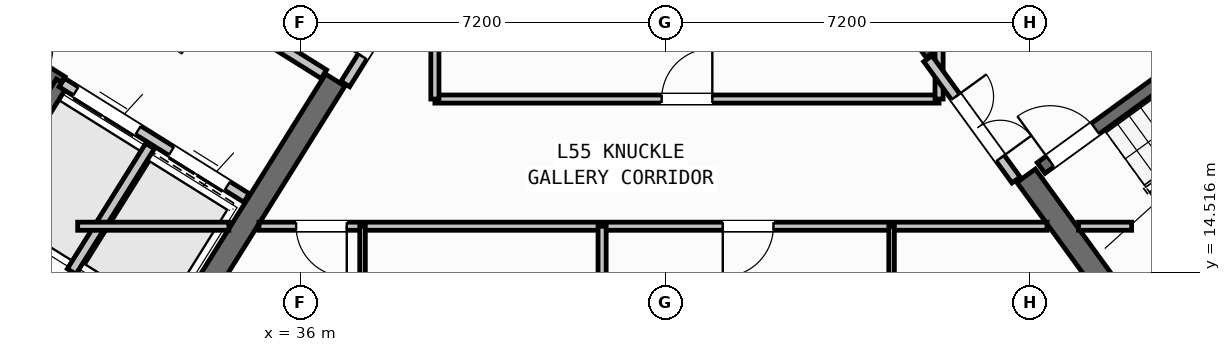
"""IFC4 building model, lengths in metres.
Left out: names, types, materials, properties, quantities, classifications, styles, units other than length and angle.
Written with IfcOpenShell. Run it as: python <this file> out.ifc"""

import sys

from ifc_helpers import new_model, si_unit, direction, frame, frame_2d, origin, place, context, subcontext, project, spatial, rectangle, extrude, source, transform, mapped, element, fill, save


model = new_model("IFC4")
c1 = context("Model", 3, precision=1e-05, world=origin(), true_north=direction((0.0, 1.0)))
c2 = subcontext(c1, "Body", "Model", "MODEL_VIEW")
j1 = project(units=[si_unit("LENGTHUNIT", "METRE"), si_unit("PLANEANGLEUNIT", "RADIAN")], contexts=[c1])
p1 = place(None, origin())
s1 = spatial("IfcSite", under=j1, at=p1, CompositionType="ELEMENT")
p2 = place(p1, origin())
s2 = spatial("IfcBuilding", under=s1, at=p2, CompositionType="ELEMENT")
p3 = place(p2, frame((0.0, 0.0, 218.4)))
s3 = spatial("IfcBuildingStorey", under=s2, at=p3, CompositionType="ELEMENT", Elevation=218.4)
p4 = place(p3, frame((33.324, 12.503, 0.0), z_axis=(0.0, 0.0, 1.0), x_axis=(-0.848043529849, 0.529926571782, 0.0)))
e1 = element("IfcWall", 1, at=p4, inside=s3, PredefinedType="SHEAR", context=c2, shape_type="SweptSolid", body=[
    extrude(rectangle(XDim=13.04, YDim=0.45, at=frame_2d((6.52, 0.0))), origin(), (0.0, 0.0, 1.0), 3.35),
])
p5 = place(p3, frame((36.683, 18.304, 0.0), z_axis=(0.0, 0.0, 1.0), x_axis=(-0.529904039071, -0.848057609704, 0.0)))
e2 = element("IfcWall", 2, at=p5, inside=s3, PredefinedType="SHEAR", context=c2, shape_type="SweptSolid", body=[
    extrude(rectangle(XDim=6.475, YDim=0.45, at=frame_2d((3.238, 0.0))), origin(), (0.0, 0.0, 1.0), 3.35),
])
p6 = place(p3, frame((52.399, 13.169, 0.0), z_axis=(0.0, 0.0, 1.0), x_axis=(0.809022352778, 0.587777877013, 0.0)))
e3 = element("IfcWall", 3, at=p6, inside=s3, PredefinedType="SHEAR", context=c2, shape_type="SweptSolid", body=[
    extrude(rectangle(XDim=12.24, YDim=0.45, at=frame_2d((6.12, 0.0))), origin(), (0.0, 0.0, 1.0), 3.35),
])
p7 = place(p3, frame((52.449, 13.483, 0.0), z_axis=(0.0, 0.0, 1.0), x_axis=(-0.587819244441, 0.808992296542, 0.0)))
e4 = element("IfcWall", 4, at=p7, inside=s3, PredefinedType="SHEAR", context=c2, shape_type="SweptSolid", body=[
    extrude(rectangle(XDim=3.625, YDim=0.45, at=frame_2d((1.812, 0.0))), origin(), (0.0, 0.0, 1.0), 3.35),
])
p8 = place(p3, frame((48.526, 18.884, 0.0), z_axis=(0.0, 0.0, 1.0), x_axis=(-0.587774812919, 0.809024578921, 0.0)))
e5 = element("IfcWall", 5, at=p8, inside=s3, PredefinedType="SHEAR", context=c2, shape_type="SweptSolid", body=[
    extrude(rectangle(XDim=6.475, YDim=0.45, at=frame_2d((3.238, 0.0))), origin(), (0.0, 0.0, 1.0), 3.35),
])
p9 = place(p3, frame((31.76, 12.183, 0.0), z_axis=(0.0, 0.0, 1.0), x_axis=(-0.848047074256, 0.529920899612, 0.0)))
e6 = element("IfcWall", 6, at=p9, inside=s3, PredefinedType="STANDARD", context=c2, shape_type="SweptSolid", body=[
    extrude(rectangle(XDim=30.652, YDim=0.32, at=frame_2d((15.326, 0.0))), origin(), (0.0, 0.0, 1.0), 3.35),
])
p10 = place(p9, frame((15.166, 0.0, 0.0)))
e7 = element("IfcOpeningElement", 7, at=p10, cuts=e6, PredefinedType="OPENING", context=c2, shape_type="SweptSolid", body=[
    extrude(rectangle(XDim=1.2, YDim=2.15, at=frame_2d((0.6, 1.075))), frame((0.0, 0.17, 0.0), z_axis=(0.0, -1.0, 0.0), x_axis=(1.0, 0.0, 0.0)), (0.0, 0.0, 1.0), 0.34),
])
p11 = place(p9, frame((2.24, 0.0, 0.9)))
e8 = element("IfcOpeningElement", 8, at=p11, cuts=e6, PredefinedType="OPENING", context=c2, shape_type="SweptSolid", body=[
    extrude(rectangle(XDim=1.65, YDim=1.45, at=frame_2d((0.825, 0.725))), frame((0.0, 0.17, 0.0), z_axis=(0.0, -1.0, 0.0), x_axis=(1.0, 0.0, 0.0)), (0.0, 0.0, 1.0), 0.34),
])
p12 = place(p9, frame((7.469, 0.0, 0.9)))
e9 = element("IfcOpeningElement", 9, at=p12, cuts=e6, PredefinedType="OPENING", context=c2, shape_type="SweptSolid", body=[
    extrude(rectangle(XDim=1.65, YDim=1.45, at=frame_2d((0.825, 0.725))), frame((0.0, 0.17, 0.0), z_axis=(0.0, -1.0, 0.0), x_axis=(1.0, 0.0, 0.0)), (0.0, 0.0, 1.0), 0.34),
])
p13 = place(p9, frame((12.623, 0.0, 1.0)))
e10 = element("IfcOpeningElement", 10, at=p13, cuts=e6, PredefinedType="OPENING", context=c2, shape_type="SweptSolid", body=[
    extrude(rectangle(XDim=0.9, YDim=1.25, at=frame_2d((0.45, 0.625))), frame((0.0, 0.17, 0.0), z_axis=(0.0, -1.0, 0.0), x_axis=(1.0, 0.0, 0.0)), (0.0, 0.0, 1.0), 0.34),
])
p14 = place(p9, frame((19.583, 0.0, 1.0)))
e11 = element("IfcOpeningElement", 11, at=p14, cuts=e6, PredefinedType="OPENING", context=c2, shape_type="SweptSolid", body=[
    extrude(rectangle(XDim=0.9, YDim=1.25, at=frame_2d((0.45, 0.625))), frame((0.0, 0.17, 0.0), z_axis=(0.0, -1.0, 0.0), x_axis=(1.0, 0.0, 0.0)), (0.0, 0.0, 1.0), 0.34),
])
p15 = place(p9, frame((22.033, 0.0, 1.0)))
e12 = element("IfcOpeningElement", 12, at=p15, cuts=e6, PredefinedType="OPENING", context=c2, shape_type="SweptSolid", body=[
    extrude(rectangle(XDim=0.9, YDim=1.25, at=frame_2d((0.45, 0.625))), frame((0.0, 0.17, 0.0), z_axis=(0.0, -1.0, 0.0), x_axis=(1.0, 0.0, 0.0)), (0.0, 0.0, 1.0), 0.34),
])
p16 = place(p9, frame((27.666, 0.0, 0.9)))
e13 = element("IfcOpeningElement", 13, at=p16, cuts=e6, PredefinedType="OPENING", context=c2, shape_type="SweptSolid", body=[
    extrude(rectangle(XDim=1.35, YDim=1.45, at=frame_2d((0.675, 0.725))), frame((0.0, 0.17, 0.0), z_axis=(0.0, -1.0, 0.0), x_axis=(1.0, 0.0, 0.0)), (0.0, 0.0, 1.0), 0.34),
])
p17 = place(p3, frame((31.28, 18.261, 0.0), z_axis=(0.0, 0.0, 1.0), x_axis=(-0.848051618787, 0.529913626805, 0.0)))
e14 = element("IfcWall", 14, at=p17, inside=s3, PredefinedType="SHEAR", context=c2, shape_type="SweptSolid", body=[
    extrude(rectangle(XDim=7.46, YDim=0.26, at=frame_2d((3.73, 0.0))), origin(), (0.0, 0.0, 1.0), 3.35),
])
p18 = place(p17, frame((0.36, 0.0, 0.0)))
e15 = element("IfcOpeningElement", 15, at=p18, cuts=e14, PredefinedType="OPENING", context=c2, shape_type="SweptSolid", body=[
    extrude(rectangle(XDim=0.86, YDim=2.05, at=frame_2d((0.43, 1.025))), frame((0.0, 0.14, 0.0), z_axis=(0.0, -1.0, 0.0), x_axis=(1.0, 0.0, 0.0)), (0.0, 0.0, 1.0), 0.28),
])
p19 = place(p3, frame((31.288, 18.256, 0.0), z_axis=(0.0, 0.0, 1.0), x_axis=(-0.529943379326, -0.848033026897, 0.0)))
e16 = element("IfcWall", 16, at=p19, inside=s3, PredefinedType="SHEAR", context=c2, shape_type="SweptSolid", body=[
    extrude(rectangle(XDim=3.16, YDim=0.26, at=frame_2d((1.58, 0.0))), origin(), (0.0, 0.0, 1.0), 3.35),
])
p20 = place(p3, frame((34.933, 15.978, 0.0), z_axis=(0.0, 0.0, 1.0), x_axis=(-0.848055739377, 0.529907032327, 0.0)))
e17 = element("IfcWall", 17, at=p20, inside=s3, PredefinedType="STANDARD", context=c2, shape_type="SweptSolid", body=[
    extrude(rectangle(XDim=4.298, YDim=0.2, at=frame_2d((2.149, 0.0))), origin(), (0.0, 0.0, 1.0), 3.34),
])
p21 = place(p20, frame((0.448, 0.0, 0.0)))
e18 = element("IfcOpeningElement", 18, at=p21, cuts=e17, PredefinedType="OPENING", context=c2, shape_type="SweptSolid", body=[
    extrude(rectangle(XDim=1.3, YDim=2.2, at=frame_2d((0.65, 1.1))), frame((0.0, 0.11, 0.0), z_axis=(0.0, -1.0, 0.0), x_axis=(1.0, 0.0, 0.0)), (0.0, 0.0, 1.0), 0.22),
])
p22 = place(p20, frame((2.523, 0.0, 0.0)))
e19 = element("IfcOpeningElement", 19, at=p22, cuts=e17, PredefinedType="OPENING", context=c2, shape_type="SweptSolid", body=[
    extrude(rectangle(XDim=1.45, YDim=2.25, at=frame_2d((0.725, 1.125))), frame((0.0, 0.11, 0.0), z_axis=(0.0, -1.0, 0.0), x_axis=(1.0, 0.0, 0.0)), (0.0, 0.0, 1.0), 0.22),
])
p23 = place(p3, frame((36.459, 18.421, 0.0), z_axis=(0.0, 0.0, 1.0), x_axis=(-0.848059591691, 0.529900867089, 0.0)))
e20 = element("IfcWall", 20, at=p23, inside=s3, PredefinedType="STANDARD", context=c2, shape_type="SweptSolid", body=[
    extrude(rectangle(XDim=5.818, YDim=0.2, at=frame_2d((2.909, 0.0))), origin(), (0.0, 0.0, 1.0), 3.34),
])
p24 = place(p23, frame((2.598, 0.0, 0.0)))
e21 = element("IfcOpeningElement", 21, at=p24, cuts=e20, PredefinedType="OPENING", context=c2, shape_type="SweptSolid", body=[
    extrude(rectangle(XDim=1.15, YDim=2.1, at=frame_2d((0.575, 1.05))), frame((0.0, 0.11, 0.0), z_axis=(0.0, -1.0, 0.0), x_axis=(1.0, 0.0, 0.0)), (0.0, 0.0, 1.0), 0.22),
])
p25 = place(p3, frame((33.029, 17.003, 0.0), z_axis=(0.0, 0.0, 1.0), x_axis=(-0.529916267533, -0.848049968695, 0.0)))
e22 = element("IfcWall", 22, at=p25, inside=s3, PredefinedType="STANDARD", context=c2, shape_type="SweptSolid", body=[
    extrude(rectangle(XDim=2.92, YDim=0.2, at=frame_2d((1.46, 0.0))), origin(), (0.0, 0.0, 1.0), 3.34),
])
p26 = place(p3, frame((52.472, 14.013, 0.0), z_axis=(0.0, 0.0, 1.0), x_axis=(0.809028366311, 0.587769599847, 0.0)))
e23 = element("IfcWall", 23, at=p26, inside=s3, PredefinedType="SHEAR", context=c2, shape_type="SweptSolid", body=[
    extrude(rectangle(XDim=7.33, YDim=0.26, at=frame_2d((3.665, 0.0))), origin(), (0.0, 0.0, 1.0), 3.35),
])
p27 = place(p3, frame((50.615, 16.57, 0.0), z_axis=(0.0, 0.0, 1.0), x_axis=(0.809028366311, 0.587769599847, 0.0)))
e24 = element("IfcWall", 24, at=p27, inside=s3, PredefinedType="SHEAR", context=c2, shape_type="SweptSolid", body=[
    extrude(rectangle(XDim=7.33, YDim=0.26, at=frame_2d((3.665, 0.0))), origin(), (0.0, 0.0, 1.0), 3.35),
])
p28 = place(p27, frame((0.22, 0.0, 0.0)))
e25 = element("IfcOpeningElement", 25, at=p28, cuts=e24, PredefinedType="OPENING", context=c2, shape_type="SweptSolid", body=[
    extrude(rectangle(XDim=1.1, YDim=2.1, at=frame_2d((0.55, 1.05))), frame((0.0, 0.14, 0.0), z_axis=(0.0, -1.0, 0.0), x_axis=(1.0, 0.0, 0.0)), (0.0, 0.0, 1.0), 0.28),
])
p29 = place(p3, frame((38.451, 20.737, 0.0), z_axis=(0.0, 0.0, 1.0), x_axis=(-0.529924799939, -0.848044637038, 0.0)))
e26 = element("IfcWall", 26, at=p29, inside=s3, PredefinedType="STANDARD", context=c2, shape_type="SweptSolid", body=[
    extrude(rectangle(XDim=2.96, YDim=0.2, at=frame_2d((1.48, 0.0))), origin(), (0.0, 0.0, 1.0), 3.34),
])
p30 = place(p29, frame((1.46, 0.0, 0.0)))
e27 = element("IfcOpeningElement", 27, at=p30, cuts=e26, PredefinedType="OPENING", context=c2, shape_type="SweptSolid", body=[
    extrude(rectangle(XDim=0.86, YDim=2.05, at=frame_2d((0.43, 1.025))), frame((0.0, 0.11, 0.0), z_axis=(0.0, -1.0, 0.0), x_axis=(1.0, 0.0, 0.0)), (0.0, 0.0, 1.0), 0.22),
])
p31 = place(p3, frame((31.6, 15.42, 0.0), z_axis=(0.0, 0.0, 1.0), x_axis=(1.0, 0.0, 0.0)))
e28 = element("IfcWall", 28, at=p31, inside=s3, PredefinedType="PARTITIONING", context=c2, shape_type="SweptSolid", body=[
    extrude(rectangle(XDim=2.984, YDim=0.16, at=frame_2d((1.492, 0.0))), origin(), (0.0, 0.0, 1.0), 3.34),
])
p32 = place(p3, frame((35.178, 15.42, 0.0), z_axis=(0.0, 0.0, 1.0), x_axis=(1.0, 0.0, 0.0)))
e29 = element("IfcWall", 29, at=p32, inside=s3, PredefinedType="PARTITIONING", context=c2, shape_type="SweptSolid", body=[
    extrude(rectangle(XDim=15.552, YDim=0.16, at=frame_2d((7.776, 0.0))), origin(), (0.0, 0.0, 1.0), 3.34),
])
p33 = place(p32, frame((0.733, 0.0, 0.0)))
e30 = element("IfcOpeningElement", 30, at=p33, cuts=e29, PredefinedType="OPENING", context=c2, shape_type="SweptSolid", body=[
    extrude(rectangle(XDim=1.0, YDim=2.1, at=frame_2d((0.5, 1.05))), frame((0.0, 0.09, 0.0), z_axis=(0.0, -1.0, 0.0), x_axis=(1.0, 0.0, 0.0)), (0.0, 0.0, 1.0), 0.18),
])
p34 = place(p32, frame((9.153, 0.0, 0.0)))
e31 = element("IfcOpeningElement", 31, at=p34, cuts=e29, PredefinedType="OPENING", context=c2, shape_type="SweptSolid", body=[
    extrude(rectangle(XDim=1.0, YDim=2.1, at=frame_2d((0.5, 1.05))), frame((0.0, 0.09, 0.0), z_axis=(0.0, -1.0, 0.0), x_axis=(1.0, 0.0, 0.0)), (0.0, 0.0, 1.0), 0.18),
])
p35 = place(p3, frame((51.354, 15.42, 0.0), z_axis=(0.0, 0.0, 1.0), x_axis=(1.0, 0.0, 0.0)))
e32 = element("IfcWall", 32, at=p35, inside=s3, PredefinedType="PARTITIONING", context=c2, shape_type="SweptSolid", body=[
    extrude(rectangle(XDim=1.046, YDim=0.16, at=frame_2d((0.523, 0.0))), origin(), (0.0, 0.0, 1.0), 3.34),
])
p36 = place(p3, frame((38.65, 17.93, 0.0), z_axis=(0.0, 0.0, 1.0), x_axis=(1.0, 0.0, 0.0)))
e33 = element("IfcWall", 33, at=p36, inside=s3, PredefinedType="PARTITIONING", context=c2, shape_type="SweptSolid", body=[
    extrude(rectangle(XDim=9.95, YDim=0.16, at=frame_2d((4.975, 0.0))), origin(), (0.0, 0.0, 1.0), 3.34),
])
p37 = place(p36, frame((4.475, 0.0, 0.0)))
e34 = element("IfcOpeningElement", 34, at=p37, cuts=e33, PredefinedType="OPENING", context=c2, shape_type="SweptSolid", body=[
    extrude(rectangle(XDim=1.0, YDim=2.1, at=frame_2d((0.5, 1.05))), frame((0.0, 0.09, 0.0), z_axis=(0.0, -1.0, 0.0), x_axis=(1.0, 0.0, 0.0)), (0.0, 0.0, 1.0), 0.18),
])
p38 = place(p3, frame((38.65, 17.93, 0.0), z_axis=(0.0, 0.0, 1.0), x_axis=(0.0, 1.0, 0.0)))
e35 = element("IfcWall", 35, at=p38, inside=s3, PredefinedType="PARTITIONING", context=c2, shape_type="SweptSolid", body=[
    extrude(rectangle(XDim=3.046, YDim=0.16, at=frame_2d((1.523, 0.0))), origin(), (0.0, 0.0, 1.0), 3.34),
])
p39 = place(p3, frame((48.6, 17.93, 0.0), z_axis=(0.0, 0.0, 1.0), x_axis=(0.0, 1.0, 0.0)))
e36 = element("IfcWall", 36, at=p39, inside=s3, PredefinedType="PARTITIONING", context=c2, shape_type="SweptSolid", body=[
    extrude(rectangle(XDim=0.993, YDim=0.16, at=frame_2d((0.496, 0.0))), origin(), (0.0, 0.0, 1.0), 3.34),
])
p40 = place(p3, frame((50.119, 16.333, 0.0), z_axis=(0.0, 0.0, 1.0), x_axis=(-0.587749856981, 0.809042709391, 0.0)))
e37 = element("IfcWall", 37, at=p40, inside=s3, PredefinedType="STANDARD", context=c2, shape_type="SweptSolid", body=[
    extrude(rectangle(XDim=2.96, YDim=0.2, at=frame_2d((1.48, 0.0))), origin(), (0.0, 0.0, 1.0), 3.34),
])
p41 = place(p40, frame((0.53, 0.0, 0.0)))
e38 = element("IfcOpeningElement", 38, at=p41, cuts=e37, PredefinedType="OPENING", context=c2, shape_type="SweptSolid", body=[
    extrude(rectangle(XDim=1.5, YDim=2.15, at=frame_2d((0.75, 1.075))), frame((0.0, 0.11, 0.0), z_axis=(0.0, -1.0, 0.0), x_axis=(1.0, 0.0, 0.0)), (0.0, 0.0, 1.0), 0.22),
])
p42 = place(p3, frame((41.95, 1.96, 0.0), z_axis=(0.0, 0.0, 1.0), x_axis=(0.0, 1.0, 0.0)))
e39 = element("IfcWall", 39, at=p42, inside=s3, PredefinedType="PARTITIONING", context=c2, shape_type="SweptSolid", body=[
    extrude(rectangle(XDim=13.46, YDim=0.16, at=frame_2d((6.73, 0.0))), origin(), (0.0, 0.0, 1.0), 3.34),
])
p43 = place(p3, frame((37.222, 1.96, 0.0), z_axis=(0.0, 0.0, 1.0), x_axis=(0.0, 1.0, 0.0)))
e40 = element("IfcWall", 40, at=p43, inside=s3, PredefinedType="PARTITIONING", context=c2, shape_type="SweptSolid", body=[
    extrude(rectangle(XDim=13.46, YDim=0.11, at=frame_2d((6.73, 0.0))), origin(), (0.0, 0.0, 1.0), 3.34),
])
p44 = place(p43, frame((5.2, 0.0, 0.0)))
e41 = element("IfcOpeningElement", 41, at=p44, cuts=e40, PredefinedType="OPENING", context=c2, shape_type="SweptSolid", body=[
    extrude(rectangle(XDim=0.92, YDim=2.08, at=frame_2d((0.46, 1.04))), frame((0.0, 0.065, 0.0), z_axis=(0.0, -1.0, 0.0), x_axis=(1.0, 0.0, 0.0)), (0.0, 0.0, 1.0), 0.13),
])
p45 = place(p43, frame((10.89, 0.0, 0.0)))
e42 = element("IfcOpeningElement", 42, at=p45, cuts=e40, PredefinedType="OPENING", context=c2, shape_type="SweptSolid", body=[
    extrude(rectangle(XDim=0.88, YDim=2.08, at=frame_2d((0.44, 1.04))), frame((0.0, 0.065, 0.0), z_axis=(0.0, -1.0, 0.0), x_axis=(1.0, 0.0, 0.0)), (0.0, 0.0, 1.0), 0.13),
])
p46 = place(p3, frame((47.663, 1.96, 0.0), z_axis=(0.0, 0.0, 1.0), x_axis=(0.0, 1.0, 0.0)))
e43 = element("IfcWall", 43, at=p46, inside=s3, PredefinedType="PARTITIONING", context=c2, shape_type="SweptSolid", body=[
    extrude(rectangle(XDim=13.46, YDim=0.11, at=frame_2d((6.73, 0.0))), origin(), (0.0, 0.0, 1.0), 3.34),
])
p47 = place(p46, frame((6.3, 0.0, 0.0)))
e44 = element("IfcOpeningElement", 44, at=p47, cuts=e43, PredefinedType="OPENING", context=c2, shape_type="SweptSolid", body=[
    extrude(rectangle(XDim=0.92, YDim=2.08, at=frame_2d((0.46, 1.04))), frame((0.0, 0.065, 0.0), z_axis=(0.0, -1.0, 0.0), x_axis=(1.0, 0.0, 0.0)), (0.0, 0.0, 1.0), 0.13),
])
p48 = place(p46, frame((11.54, 0.0, 0.0)))
e45 = element("IfcOpeningElement", 45, at=p48, cuts=e43, PredefinedType="OPENING", context=c2, shape_type="SweptSolid", body=[
    extrude(rectangle(XDim=0.88, YDim=2.08, at=frame_2d((0.44, 1.04))), frame((0.0, 0.065, 0.0), z_axis=(0.0, -1.0, 0.0), x_axis=(1.0, 0.0, 0.0)), (0.0, 0.0, 1.0), 0.13),
])
m1 = source(origin(), c2, "Body", "SweptSolid", [
    extrude(rectangle(XDim=1.3, YDim=2.2, at=frame_2d((0.65, 1.1))), frame((0.0, 0.025, 0.0), z_axis=(0.0, -1.0, 0.0), x_axis=(1.0, 0.0, 0.0)), (0.0, 0.0, 1.0), 0.05),
])
p49 = place(p21, origin())
e46 = element("IfcDoor", 46, at=p49, inside=s3, OperationType="DOUBLE_DOOR_SLIDING", PredefinedType="DOOR", context=c2, shape_type="MappedRepresentation", body=[
    mapped(m1, transform((0.0, 0.0, 0.0), scale=1.0)),
])
fill(e18, e46)
m2 = source(origin(), c2, "Body", "SweptSolid", [
    extrude(rectangle(XDim=1.45, YDim=2.25, at=frame_2d((0.725, 1.125))), frame((0.0, 0.025, 0.0), z_axis=(0.0, -1.0, 0.0), x_axis=(1.0, 0.0, 0.0)), (0.0, 0.0, 1.0), 0.05),
])
p50 = place(p22, origin())
e47 = element("IfcDoor", 47, at=p50, inside=s3, OperationType="DOUBLE_DOOR_SLIDING", PredefinedType="DOOR", context=c2, shape_type="MappedRepresentation", body=[
    mapped(m2, transform((0.0, 0.0, 0.0), scale=1.0)),
])
fill(e19, e47)
m3 = source(origin(), c2, "Body", "SweptSolid", [
    extrude(rectangle(XDim=1.1, YDim=2.1, at=frame_2d((0.55, 1.05))), frame((0.0, 0.025, 0.0), z_axis=(0.0, -1.0, 0.0), x_axis=(1.0, 0.0, 0.0)), (0.0, 0.0, 1.0), 0.05),
])
p51 = place(p28, origin())
e48 = element("IfcDoor", 48, at=p51, inside=s3, OperationType="SINGLE_SWING_LEFT", PredefinedType="DOOR", context=c2, shape_type="MappedRepresentation", body=[
    mapped(m3, transform((0.0, 0.0, 0.0), scale=1.0)),
])
fill(e25, e48)
m4 = source(origin(), c2, "Body", "SweptSolid", [
    extrude(rectangle(XDim=1.0, YDim=2.1, at=frame_2d((0.5, 1.05))), frame((0.0, 0.025, 0.0), z_axis=(0.0, -1.0, 0.0), x_axis=(1.0, 0.0, 0.0)), (0.0, 0.0, 1.0), 0.05),
])
p52 = place(p37, origin())
e49 = element("IfcDoor", 49, at=p52, inside=s3, OperationType="SINGLE_SWING_RIGHT", PredefinedType="DOOR", context=c2, shape_type="MappedRepresentation", body=[
    mapped(m4, transform((0.0, 0.0, 0.0), scale=1.0)),
])
fill(e34, e49)
m5 = source(origin(), c2, "Body", "SweptSolid", [
    extrude(rectangle(XDim=0.86, YDim=2.05, at=frame_2d((0.43, 1.025))), frame((0.0, 0.025, 0.0), z_axis=(0.0, -1.0, 0.0), x_axis=(1.0, 0.0, 0.0)), (0.0, 0.0, 1.0), 0.05),
])
p53 = place(p30, frame((0.86, 0.0, 0.0), z_axis=(0.0, 0.0, 1.0), x_axis=(-1.0, 0.0, 0.0)))
e50 = element("IfcDoor", 50, at=p53, inside=s3, OperationType="SINGLE_SWING_LEFT", PredefinedType="DOOR", context=c2, shape_type="MappedRepresentation", body=[
    mapped(m5, transform((0.0, 0.0, 0.0), scale=1.0)),
])
fill(e27, e50)
m6 = source(origin(), c2, "Body", "SweptSolid", [
    extrude(rectangle(XDim=1.5, YDim=2.15, at=frame_2d((0.75, 1.075))), frame((0.0, 0.025, 0.0), z_axis=(0.0, -1.0, 0.0), x_axis=(1.0, 0.0, 0.0)), (0.0, 0.0, 1.0), 0.05),
])
p54 = place(p41, frame((1.5, 0.0, 0.0), z_axis=(0.0, 0.0, 1.0), x_axis=(-1.0, 0.0, 0.0)))
e51 = element("IfcDoor", 51, at=p54, inside=s3, OperationType="DOUBLE_DOOR_SINGLE_SWING", PredefinedType="DOOR", context=c2, shape_type="MappedRepresentation", body=[
    mapped(m6, transform((0.0, 0.0, 0.0), scale=1.0)),
])
fill(e38, e51)
p55 = place(p33, frame((1.0, 0.0, 0.0), z_axis=(0.0, 0.0, 1.0), x_axis=(-1.0, 0.0, 0.0)))
e52 = element("IfcDoor", 52, at=p55, inside=s3, OperationType="SINGLE_SWING_LEFT", PredefinedType="DOOR", context=c2, shape_type="MappedRepresentation", body=[
    mapped(m4, transform((0.0, 0.0, 0.0), scale=1.0)),
])
fill(e30, e52)
p56 = place(p34, frame((1.0, 0.0, 0.0), z_axis=(0.0, 0.0, 1.0), x_axis=(-1.0, 0.0, 0.0)))
e53 = element("IfcDoor", 53, at=p56, inside=s3, OperationType="SINGLE_SWING_RIGHT", PredefinedType="DOOR", context=c2, shape_type="MappedRepresentation", body=[
    mapped(m4, transform((0.0, 0.0, 0.0), scale=1.0)),
])
fill(e31, e53)
save(model, sys.argv[1])
